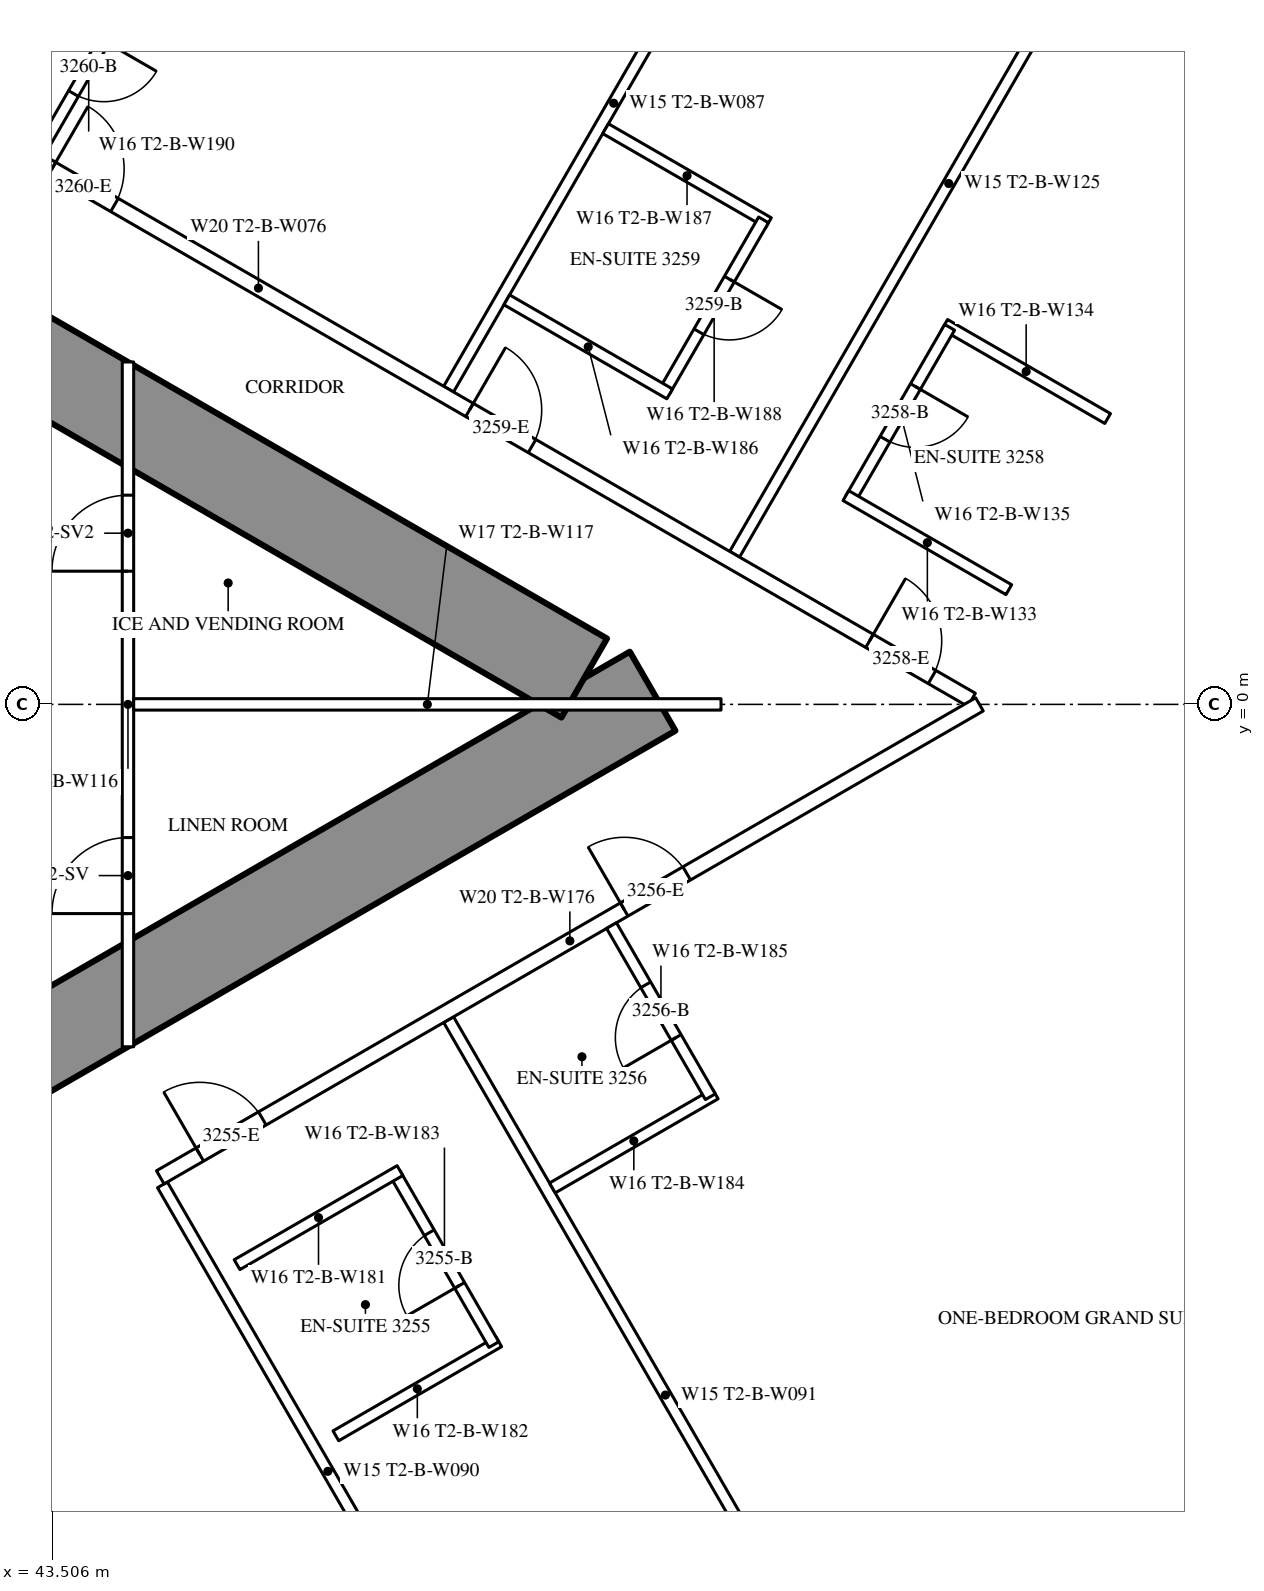
"""IFC4 building model, lengths in metres.
Left out: names, types, materials, properties, quantities, classifications, styles, units other than length and angle.
Written with IfcOpenShell. Run it as: python <this file> out.ifc"""

import sys

from ifc_helpers import new_model, si_unit, direction, frame, frame_2d, origin, place, context, subcontext, project, spatial, rectangle, extrude, element, fill, save


model = new_model("IFC4")
c1 = context("Model", 3, precision=1e-05, world=origin(), true_north=direction((0.0, 1.0)))
c2 = subcontext(c1, "Body", "Model", "MODEL_VIEW")
j1 = project(units=[si_unit("LENGTHUNIT", "METRE"), si_unit("PLANEANGLEUNIT", "RADIAN")], contexts=[c1])
p1 = place(None, origin())
s1 = spatial("IfcSite", under=j1, at=p1, CompositionType="ELEMENT")
p2 = place(p1, origin())
s2 = spatial("IfcBuilding", under=s1, at=p2, CompositionType="ELEMENT")
p3 = place(p2, frame((0.0, 0.0, 122.1)))
s3 = spatial("IfcBuildingStorey", under=s2, at=p3, CompositionType="ELEMENT", Elevation=122.1)
p4 = place(p3, frame((27.2, -13.8, 0.0), z_axis=(0.0, 0.0, 1.0), x_axis=(0.866027159892, 0.499996958321, 0.0)))
e1 = element("IfcWall", 1, at=p4, inside=s3, PredefinedType="SHEAR", context=c2, shape_type="SweptSolid", body=[
    extrude(rectangle(XDim=27.947, YDim=1.2, at=frame_2d((13.973, 0.0))), origin(), (0.0, 0.0, 1.0), 3.5),
])
p5 = place(p4, frame((4.6, 0.0, 0.0)))
e2 = element("IfcOpeningElement", 2, at=p5, cuts=e1, PredefinedType="OPENING", context=c2, shape_type="SweptSolid", body=[
    extrude(rectangle(XDim=1.0, YDim=2.2, at=frame_2d((0.5, 1.1))), frame((0.0, 0.61, 0.0), z_axis=(0.0, -1.0, 0.0), x_axis=(1.0, 0.0, 0.0)), (0.0, 0.0, 1.0), 1.22),
])
p6 = place(p4, frame((13.395, 0.0, 0.0)))
e3 = element("IfcOpeningElement", 3, at=p6, cuts=e1, PredefinedType="OPENING", context=c2, shape_type="SweptSolid", body=[
    extrude(rectangle(XDim=1.8, YDim=2.2, at=frame_2d((0.9, 1.1))), frame((0.0, 0.61, 0.0), z_axis=(0.0, -1.0, 0.0), x_axis=(1.0, 0.0, 0.0)), (0.0, 0.0, 1.0), 1.22),
])
p7 = place(p3, frame((27.2, 13.8, 0.0), z_axis=(0.0, 0.0, 1.0), x_axis=(0.866024515034, -0.500001539357, 0.0)))
e4 = element("IfcWall", 4, at=p7, inside=s3, PredefinedType="SHEAR", context=c2, shape_type="SweptSolid", body=[
    extrude(rectangle(XDim=26.907, YDim=1.2, at=frame_2d((13.454, 0.0))), origin(), (0.0, 0.0, 1.0), 3.5),
])
p8 = place(p7, frame((4.6, 0.0, 0.0)))
e5 = element("IfcOpeningElement", 5, at=p8, cuts=e4, PredefinedType="OPENING", context=c2, shape_type="SweptSolid", body=[
    extrude(rectangle(XDim=1.0, YDim=2.2, at=frame_2d((0.5, 1.1))), frame((0.0, 0.61, 0.0), z_axis=(0.0, -1.0, 0.0), x_axis=(1.0, 0.0, 0.0)), (0.0, 0.0, 1.0), 1.22),
])
p9 = place(p7, frame((13.395, 0.0, 0.0)))
e6 = element("IfcOpeningElement", 6, at=p9, cuts=e4, PredefinedType="OPENING", context=c2, shape_type="SweptSolid", body=[
    extrude(rectangle(XDim=1.8, YDim=2.2, at=frame_2d((0.9, 1.1))), frame((0.0, 0.61, 0.0), z_axis=(0.0, -1.0, 0.0), x_axis=(1.0, 0.0, 0.0)), (0.0, 0.0, 1.0), 1.22),
])
p10 = place(p3, frame((41.19, -8.494, 0.0), z_axis=(0.0, 0.0, 1.0), x_axis=(0.49999258054, -0.866029687369, 0.0)))
e7 = element("IfcWall", 7, at=p10, inside=s3, PredefinedType="PARTITIONING", context=c2, shape_type="SweptSolid", body=[
    extrude(rectangle(XDim=11.318, YDim=0.15, at=frame_2d((5.659, 0.0))), origin(), (0.0, 0.0, 1.0), 3.25),
])
p11 = place(p3, frame((44.954, -6.321, 0.0), z_axis=(0.0, 0.0, 1.0), x_axis=(0.500018676722, -0.866014620505, 0.0)))
e8 = element("IfcWall", 8, at=p11, inside=s3, PredefinedType="PARTITIONING", context=c2, shape_type="SweptSolid", body=[
    extrude(rectangle(XDim=8.704, YDim=0.15, at=frame_2d((4.352, 0.0))), origin(), (0.0, 0.0, 1.0), 2.2),
])
p12 = place(p3, frame((48.719, -4.147, 0.0), z_axis=(0.0, 0.0, 1.0), x_axis=(0.499990498062, -0.866030889661, 0.0)))
e9 = element("IfcWall", 9, at=p12, inside=s3, PredefinedType="PARTITIONING", context=c2, shape_type="SweptSolid", body=[
    extrude(rectangle(XDim=11.406, YDim=0.15, at=frame_2d((5.703, 0.0))), origin(), (0.0, 0.0, 1.0), 3.25),
])
p13 = place(p3, frame((41.19, 8.494, 0.0), z_axis=(0.0, 0.0, 1.0), x_axis=(0.49999258054, 0.866029687369, 0.0)))
e10 = element("IfcWall", 10, at=p13, inside=s3, PredefinedType="PARTITIONING", context=c2, shape_type="SweptSolid", body=[
    extrude(rectangle(XDim=11.318, YDim=0.15, at=frame_2d((5.659, 0.0))), origin(), (0.0, 0.0, 1.0), 3.25),
])
p14 = place(p3, frame((48.719, 4.147, 0.0), z_axis=(0.0, 0.0, 1.0), x_axis=(0.499993328235, 0.866029255696, 0.0)))
e11 = element("IfcWall", 11, at=p14, inside=s3, PredefinedType="PARTITIONING", context=c2, shape_type="SweptSolid", body=[
    extrude(rectangle(XDim=8.686, YDim=0.15, at=frame_2d((4.343, 0.0))), origin(), (0.0, 0.0, 1.0), 2.2),
])
p15 = place(p3, frame((52.481, 1.975, 0.0), z_axis=(0.0, 0.0, 1.0), x_axis=(0.500003867771, 0.866023170714, 0.0)))
e12 = element("IfcWall", 12, at=p15, inside=s3, PredefinedType="PARTITIONING", context=c2, shape_type="SweptSolid", body=[
    extrude(rectangle(XDim=11.265, YDim=0.15, at=frame_2d((5.632, 0.0))), origin(), (0.0, 0.0, 1.0), 3.25),
])
p16 = place(p3, frame((36.834, 10.894, 0.0), z_axis=(0.0, 0.0, 1.0), x_axis=(0.866028157229, -0.499995230863, 0.0)))
e13 = element("IfcWall", 13, at=p16, inside=s3, PredefinedType="PARTITIONING", context=c2, shape_type="SweptSolid", body=[
    extrude(rectangle(XDim=21.667, YDim=0.2, at=frame_2d((10.833, 0.0))), origin(), (0.0, 0.0, 1.0), 3.25),
])
p17 = place(p16, frame((20.117, 0.0, 0.0)))
e14 = element("IfcOpeningElement", 14, at=p17, cuts=e13, PredefinedType="OPENING", context=c2, shape_type="SweptSolid", body=[
    extrude(rectangle(XDim=0.95, YDim=2.2, at=frame_2d((0.475, 1.1))), frame((0.0, 0.11, 0.0), z_axis=(0.0, -1.0, 0.0), x_axis=(1.0, 0.0, 0.0)), (0.0, 0.0, 1.0), 0.22),
])
p18 = place(p16, frame((14.04, 0.0, 0.0)))
e15 = element("IfcOpeningElement", 15, at=p18, cuts=e13, PredefinedType="OPENING", context=c2, shape_type="SweptSolid", body=[
    extrude(rectangle(XDim=0.95, YDim=2.2, at=frame_2d((0.475, 1.1))), frame((0.0, 0.11, 0.0), z_axis=(0.0, -1.0, 0.0), x_axis=(1.0, 0.0, 0.0)), (0.0, 0.0, 1.0), 0.22),
])
p19 = place(p16, frame((7.697, 0.0, 0.0)))
e16 = element("IfcOpeningElement", 16, at=p19, cuts=e13, PredefinedType="OPENING", context=c2, shape_type="SweptSolid", body=[
    extrude(rectangle(XDim=0.95, YDim=2.2, at=frame_2d((0.475, 1.1))), frame((0.0, 0.11, 0.0), z_axis=(0.0, -1.0, 0.0), x_axis=(1.0, 0.0, 0.0)), (0.0, 0.0, 1.0), 0.22),
])
p20 = place(p16, frame((3.35, 0.0, 0.0)))
e17 = element("IfcOpeningElement", 17, at=p20, cuts=e13, PredefinedType="OPENING", context=c2, shape_type="SweptSolid", body=[
    extrude(rectangle(XDim=1.0, YDim=2.2, at=frame_2d((0.5, 1.1))), frame((0.0, 0.11, 0.0), z_axis=(0.0, -1.0, 0.0), x_axis=(1.0, 0.0, 0.0)), (0.0, 0.0, 1.0), 0.22),
])
p21 = place(p3, frame((44.925, -6.222, 0.0), z_axis=(0.0, 0.0, 1.0), x_axis=(0.866020269055, 0.500008893506, 0.0)))
e18 = element("IfcWall", 18, at=p21, inside=s3, PredefinedType="PARTITIONING", context=c2, shape_type="SweptSolid", body=[
    extrude(rectangle(XDim=12.444, YDim=0.2, at=frame_2d((6.222, 0.0))), origin(), (0.0, 0.0, 1.0), 3.25),
])
p22 = place(p21, frame((0.6, 0.0, 0.0)))
e19 = element("IfcOpeningElement", 19, at=p22, cuts=e18, PredefinedType="OPENING", context=c2, shape_type="SweptSolid", body=[
    extrude(rectangle(XDim=0.95, YDim=2.2, at=frame_2d((0.475, 1.1))), frame((0.0, 0.11, 0.0), z_axis=(0.0, -1.0, 0.0), x_axis=(1.0, 0.0, 0.0)), (0.0, 0.0, 1.0), 0.22),
])
p23 = place(p21, frame((7.047, 0.0, 0.0)))
e20 = element("IfcOpeningElement", 20, at=p23, cuts=e18, PredefinedType="OPENING", context=c2, shape_type="SweptSolid", body=[
    extrude(rectangle(XDim=0.95, YDim=2.2, at=frame_2d((0.475, 1.1))), frame((0.0, 0.11, 0.0), z_axis=(0.0, -1.0, 0.0), x_axis=(1.0, 0.0, 0.0)), (0.0, 0.0, 1.0), 0.22),
])
p24 = place(p3, frame((47.235, -9.623, 0.0), z_axis=(0.0, 0.0, 1.0), x_axis=(0.866006523861, 0.500032699561, 0.0)))
e21 = element("IfcWall", 21, at=p24, inside=s3, PredefinedType="PARTITIONING", context=c2, shape_type="SweptSolid", body=[
    extrude(rectangle(XDim=2.475, YDim=0.15, at=frame_2d((1.237, 0.0))), origin(), (0.0, 0.0, 1.0), 3.25),
])
p25 = place(p3, frame((48.013, -6.171, 0.0), z_axis=(0.0, 0.0, 1.0), x_axis=(0.500006934395, -0.866021400173, 0.0)))
e22 = element("IfcWall", 22, at=p25, inside=s3, PredefinedType="PARTITIONING", context=c2, shape_type="SweptSolid", body=[
    extrude(rectangle(XDim=2.6, YDim=0.15, at=frame_2d((1.3, 0.0))), origin(), (0.0, 0.0, 1.0), 3.25),
])
p26 = place(p25, frame((0.9, 0.0, 0.0)))
e23 = element("IfcOpeningElement", 23, at=p26, cuts=e22, PredefinedType="OPENING", context=c2, shape_type="SweptSolid", body=[
    extrude(rectangle(XDim=0.8, YDim=2.2, at=frame_2d((0.4, 1.1))), frame((0.0, 0.085, 0.0), z_axis=(0.0, -1.0, 0.0), x_axis=(1.0, 0.0, 0.0)), (0.0, 0.0, 1.0), 0.17),
])
p27 = place(p3, frame((45.935, -7.371, 0.0), z_axis=(0.0, 0.0, 1.0), x_axis=(0.866031185235, 0.4999899861, 0.0)))
e24 = element("IfcWall", 24, at=p27, inside=s3, PredefinedType="PARTITIONING", context=c2, shape_type="SweptSolid", body=[
    extrude(rectangle(XDim=2.475, YDim=0.15, at=frame_2d((1.238, 0.0))), origin(), (0.0, 0.0, 1.0), 3.25),
])
p28 = place(p3, frame((50.083, -6.362, 0.0), z_axis=(0.0, 0.0, 1.0), x_axis=(0.866006523861, 0.500032699561, 0.0)))
e25 = element("IfcWall", 25, at=p28, inside=s3, PredefinedType="PARTITIONING", context=c2, shape_type="SweptSolid", body=[
    extrude(rectangle(XDim=2.475, YDim=0.15, at=frame_2d((1.237, 0.0))), origin(), (0.0, 0.0, 1.0), 3.25),
])
p29 = place(p3, frame((50.862, -2.91, 0.0), z_axis=(0.0, 0.0, 1.0), x_axis=(0.500047596559, -0.865997922154, 0.0)))
e26 = element("IfcWall", 26, at=p29, inside=s3, PredefinedType="PARTITIONING", context=c2, shape_type="SweptSolid", body=[
    extrude(rectangle(XDim=2.6, YDim=0.15, at=frame_2d((1.3, 0.0))), origin(), (0.0, 0.0, 1.0), 3.25),
])
p30 = place(p29, frame((0.9, 0.0, 0.0)))
e27 = element("IfcOpeningElement", 27, at=p30, cuts=e26, PredefinedType="OPENING", context=c2, shape_type="SweptSolid", body=[
    extrude(rectangle(XDim=0.8, YDim=2.2, at=frame_2d((0.4, 1.1))), frame((0.0, 0.085, 0.0), z_axis=(0.0, -1.0, 0.0), x_axis=(1.0, 0.0, 0.0)), (0.0, 0.0, 1.0), 0.17),
])
p31 = place(p3, frame((55.245, 4.998, 0.0), z_axis=(0.0, 0.0, 1.0), x_axis=(0.866006523861, -0.500032699561, 0.0)))
e28 = element("IfcWall", 28, at=p31, inside=s3, PredefinedType="PARTITIONING", context=c2, shape_type="SweptSolid", body=[
    extrude(rectangle(XDim=2.475, YDim=0.15, at=frame_2d((1.237, 0.0))), origin(), (0.0, 0.0, 1.0), 3.25),
])
p32 = place(p3, frame((54.01, 2.709, 0.0), z_axis=(0.0, 0.0, 1.0), x_axis=(0.500006934395, 0.866021400173, 0.0)))
e29 = element("IfcWall", 29, at=p32, inside=s3, PredefinedType="PARTITIONING", context=c2, shape_type="SweptSolid", body=[
    extrude(rectangle(XDim=2.6, YDim=0.15, at=frame_2d((1.3, 0.0))), origin(), (0.0, 0.0, 1.0), 3.25),
])
p33 = place(p32, frame((0.9, 0.0, 0.0)))
e30 = element("IfcOpeningElement", 30, at=p33, cuts=e29, PredefinedType="OPENING", context=c2, shape_type="SweptSolid", body=[
    extrude(rectangle(XDim=0.8, YDim=2.2, at=frame_2d((0.4, 1.1))), frame((0.0, 0.085, 0.0), z_axis=(0.0, -1.0, 0.0), x_axis=(1.0, 0.0, 0.0)), (0.0, 0.0, 1.0), 0.17),
])
p34 = place(p3, frame((53.945, 2.747, 0.0), z_axis=(0.0, 0.0, 1.0), x_axis=(0.866031185235, -0.4999899861, 0.0)))
e31 = element("IfcWall", 31, at=p34, inside=s3, PredefinedType="PARTITIONING", context=c2, shape_type="SweptSolid", body=[
    extrude(rectangle(XDim=2.475, YDim=0.15, at=frame_2d((1.238, 0.0))), origin(), (0.0, 0.0, 1.0), 3.25),
])
p35 = place(p3, frame((50.783, 7.574, 0.0), z_axis=(0.0, 0.0, 1.0), x_axis=(0.866006523861, -0.500032699561, 0.0)))
e32 = element("IfcWall", 32, at=p35, inside=s3, PredefinedType="PARTITIONING", context=c2, shape_type="SweptSolid", body=[
    extrude(rectangle(XDim=2.475, YDim=0.15, at=frame_2d((1.237, 0.0))), origin(), (0.0, 0.0, 1.0), 3.25),
])
p36 = place(p3, frame((51.562, 4.123, 0.0), z_axis=(0.0, 0.0, 1.0), x_axis=(0.49997716683, 0.86603858612, 0.0)))
e33 = element("IfcWall", 33, at=p36, inside=s3, PredefinedType="PARTITIONING", context=c2, shape_type="SweptSolid", body=[
    extrude(rectangle(XDim=2.6, YDim=0.15, at=frame_2d((1.3, 0.0))), origin(), (0.0, 0.0, 1.0), 3.25),
])
p37 = place(p36, frame((0.9, 0.0, 0.0)))
e34 = element("IfcOpeningElement", 34, at=p37, cuts=e33, PredefinedType="OPENING", context=c2, shape_type="SweptSolid", body=[
    extrude(rectangle(XDim=0.8, YDim=2.2, at=frame_2d((0.4, 1.1))), frame((0.0, 0.085, 0.0), z_axis=(0.0, -1.0, 0.0), x_axis=(1.0, 0.0, 0.0)), (0.0, 0.0, 1.0), 0.17),
])
p38 = place(p3, frame((49.483, 5.323, 0.0), z_axis=(0.0, 0.0, 1.0), x_axis=(0.866031185235, -0.4999899861, 0.0)))
e35 = element("IfcWall", 35, at=p38, inside=s3, PredefinedType="PARTITIONING", context=c2, shape_type="SweptSolid", body=[
    extrude(rectangle(XDim=2.475, YDim=0.15, at=frame_2d((1.238, 0.0))), origin(), (0.0, 0.0, 1.0), 3.25),
])
p39 = place(p3, frame((43.333, 7.257, 0.0), z_axis=(0.0, 0.0, 1.0), x_axis=(0.500006934395, 0.866021400173, 0.0)))
e36 = element("IfcWall", 36, at=p39, inside=s3, PredefinedType="PARTITIONING", context=c2, shape_type="SweptSolid", body=[
    extrude(rectangle(XDim=2.6, YDim=0.15, at=frame_2d((1.3, 0.0))), origin(), (0.0, 0.0, 1.0), 3.25),
])
p40 = place(p39, frame((0.9, 0.0, 0.0)))
e37 = element("IfcOpeningElement", 37, at=p40, cuts=e36, PredefinedType="OPENING", context=c2, shape_type="SweptSolid", body=[
    extrude(rectangle(XDim=0.8, YDim=2.2, at=frame_2d((0.4, 1.1))), frame((0.0, 0.085, 0.0), z_axis=(0.0, -1.0, 0.0), x_axis=(1.0, 0.0, 0.0)), (0.0, 0.0, 1.0), 0.17),
])
p41 = place(p3, frame((44.5, -4.505, 0.0), z_axis=(0.0, 0.0, 1.0), x_axis=(0.0, 1.0, 0.0)))
e38 = element("IfcWall", 38, at=p41, inside=s3, PredefinedType="PARTITIONING", context=c2, shape_type="SweptSolid", body=[
    extrude(rectangle(XDim=9.009, YDim=0.15, at=frame_2d((4.505, 0.0))), origin(), (0.0, 0.0, 1.0), 2.45),
])
p42 = place(p41, frame((1.752, 0.0, 0.0)))
e39 = element("IfcOpeningElement", 39, at=p42, cuts=e38, PredefinedType="OPENING", context=c2, shape_type="SweptSolid", body=[
    extrude(rectangle(XDim=1.0, YDim=2.2, at=frame_2d((0.5, 1.1))), frame((0.0, 0.085, 0.0), z_axis=(0.0, -1.0, 0.0), x_axis=(1.0, 0.0, 0.0)), (0.0, 0.0, 1.0), 0.17),
])
p43 = place(p41, frame((6.257, 0.0, 0.0)))
e40 = element("IfcOpeningElement", 40, at=p43, cuts=e38, PredefinedType="OPENING", context=c2, shape_type="SweptSolid", body=[
    extrude(rectangle(XDim=1.0, YDim=2.2, at=frame_2d((0.5, 1.1))), frame((0.0, 0.085, 0.0), z_axis=(0.0, -1.0, 0.0), x_axis=(1.0, 0.0, 0.0)), (0.0, 0.0, 1.0), 0.17),
])
p44 = place(p3, frame((44.575, 0.0, 0.0), z_axis=(0.0, 0.0, 1.0), x_axis=(1.0, 0.0, 0.0)))
e41 = element("IfcWall", 41, at=p44, inside=s3, PredefinedType="PARTITIONING", context=c2, shape_type="SweptSolid", body=[
    extrude(rectangle(XDim=7.727, YDim=0.15, at=frame_2d((3.864, 0.0))), origin(), (0.0, 0.0, 1.0), 2.2),
])
p45 = place(p26, origin())
e42 = element("IfcDoor", 42, at=p45, inside=s3, OperationType="SINGLE_SWING_RIGHT", PredefinedType="DOOR", context=c2, shape_type="SweptSolid", body=[
    extrude(rectangle(XDim=0.8, YDim=2.2, at=frame_2d((0.4, 1.1))), frame((0.0, 0.025, 0.0), z_axis=(0.0, -1.0, 0.0), x_axis=(1.0, 0.0, 0.0)), (0.0, 0.0, 1.0), 0.05),
])
fill(e23, e42)
p46 = place(p22, origin())
e43 = element("IfcDoor", 43, at=p46, inside=s3, OperationType="SINGLE_SWING_LEFT", PredefinedType="DOOR", context=c2, shape_type="SweptSolid", body=[
    extrude(rectangle(XDim=0.95, YDim=2.2, at=frame_2d((0.475, 1.1))), frame((0.0, 0.025, 0.0), z_axis=(0.0, -1.0, 0.0), x_axis=(1.0, 0.0, 0.0)), (0.0, 0.0, 1.0), 0.05),
])
fill(e19, e43)
p47 = place(p30, origin())
e44 = element("IfcDoor", 44, at=p47, inside=s3, OperationType="SINGLE_SWING_RIGHT", PredefinedType="DOOR", context=c2, shape_type="SweptSolid", body=[
    extrude(rectangle(XDim=0.8, YDim=2.2, at=frame_2d((0.4, 1.1))), frame((0.0, 0.025, 0.0), z_axis=(0.0, -1.0, 0.0), x_axis=(1.0, 0.0, 0.0)), (0.0, 0.0, 1.0), 0.05),
])
fill(e27, e44)
p48 = place(p23, origin())
e45 = element("IfcDoor", 45, at=p48, inside=s3, OperationType="SINGLE_SWING_LEFT", PredefinedType="DOOR", context=c2, shape_type="SweptSolid", body=[
    extrude(rectangle(XDim=0.95, YDim=2.2, at=frame_2d((0.475, 1.1))), frame((0.0, 0.025, 0.0), z_axis=(0.0, -1.0, 0.0), x_axis=(1.0, 0.0, 0.0)), (0.0, 0.0, 1.0), 0.05),
])
fill(e20, e45)
p49 = place(p33, origin())
e46 = element("IfcDoor", 46, at=p49, inside=s3, OperationType="SINGLE_SWING_RIGHT", PredefinedType="DOOR", context=c2, shape_type="SweptSolid", body=[
    extrude(rectangle(XDim=0.8, YDim=2.2, at=frame_2d((0.4, 1.1))), frame((0.0, 0.025, 0.0), z_axis=(0.0, -1.0, 0.0), x_axis=(1.0, 0.0, 0.0)), (0.0, 0.0, 1.0), 0.05),
])
fill(e30, e46)
p50 = place(p17, origin())
e47 = element("IfcDoor", 47, at=p50, inside=s3, OperationType="SINGLE_SWING_LEFT", PredefinedType="DOOR", context=c2, shape_type="SweptSolid", body=[
    extrude(rectangle(XDim=0.95, YDim=2.2, at=frame_2d((0.475, 1.1))), frame((0.0, 0.025, 0.0), z_axis=(0.0, -1.0, 0.0), x_axis=(1.0, 0.0, 0.0)), (0.0, 0.0, 1.0), 0.05),
])
fill(e14, e47)
p51 = place(p37, origin())
e48 = element("IfcDoor", 48, at=p51, inside=s3, OperationType="SINGLE_SWING_RIGHT", PredefinedType="DOOR", context=c2, shape_type="SweptSolid", body=[
    extrude(rectangle(XDim=0.8, YDim=2.2, at=frame_2d((0.4, 1.1))), frame((0.0, 0.025, 0.0), z_axis=(0.0, -1.0, 0.0), x_axis=(1.0, 0.0, 0.0)), (0.0, 0.0, 1.0), 0.05),
])
fill(e34, e48)
p52 = place(p18, origin())
e49 = element("IfcDoor", 49, at=p52, inside=s3, OperationType="SINGLE_SWING_LEFT", PredefinedType="DOOR", context=c2, shape_type="SweptSolid", body=[
    extrude(rectangle(XDim=0.95, YDim=2.2, at=frame_2d((0.475, 1.1))), frame((0.0, 0.025, 0.0), z_axis=(0.0, -1.0, 0.0), x_axis=(1.0, 0.0, 0.0)), (0.0, 0.0, 1.0), 0.05),
])
fill(e15, e49)
p53 = place(p40, origin())
e50 = element("IfcDoor", 50, at=p53, inside=s3, OperationType="SINGLE_SWING_RIGHT", PredefinedType="DOOR", context=c2, shape_type="SweptSolid", body=[
    extrude(rectangle(XDim=0.8, YDim=2.2, at=frame_2d((0.4, 1.1))), frame((0.0, 0.025, 0.0), z_axis=(0.0, -1.0, 0.0), x_axis=(1.0, 0.0, 0.0)), (0.0, 0.0, 1.0), 0.05),
])
fill(e37, e50)
p54 = place(p19, origin())
e51 = element("IfcDoor", 51, at=p54, inside=s3, OperationType="SINGLE_SWING_LEFT", PredefinedType="DOOR", context=c2, shape_type="SweptSolid", body=[
    extrude(rectangle(XDim=0.95, YDim=2.2, at=frame_2d((0.475, 1.1))), frame((0.0, 0.025, 0.0), z_axis=(0.0, -1.0, 0.0), x_axis=(1.0, 0.0, 0.0)), (0.0, 0.0, 1.0), 0.05),
])
fill(e16, e51)
p55 = place(p42, origin())
e52 = element("IfcDoor", 52, at=p55, inside=s3, OperationType="SINGLE_SWING_LEFT", PredefinedType="DOOR", context=c2, shape_type="SweptSolid", body=[
    extrude(rectangle(XDim=1.0, YDim=2.2, at=frame_2d((0.5, 1.1))), frame((0.0, 0.025, 0.0), z_axis=(0.0, -1.0, 0.0), x_axis=(1.0, 0.0, 0.0)), (0.0, 0.0, 1.0), 0.05),
])
fill(e39, e52)
p56 = place(p43, origin())
e53 = element("IfcDoor", 53, at=p56, inside=s3, OperationType="SINGLE_SWING_LEFT", PredefinedType="DOOR", context=c2, shape_type="SweptSolid", body=[
    extrude(rectangle(XDim=1.0, YDim=2.2, at=frame_2d((0.5, 1.1))), frame((0.0, 0.025, 0.0), z_axis=(0.0, -1.0, 0.0), x_axis=(1.0, 0.0, 0.0)), (0.0, 0.0, 1.0), 0.05),
])
fill(e40, e53)
save(model, sys.argv[1])
